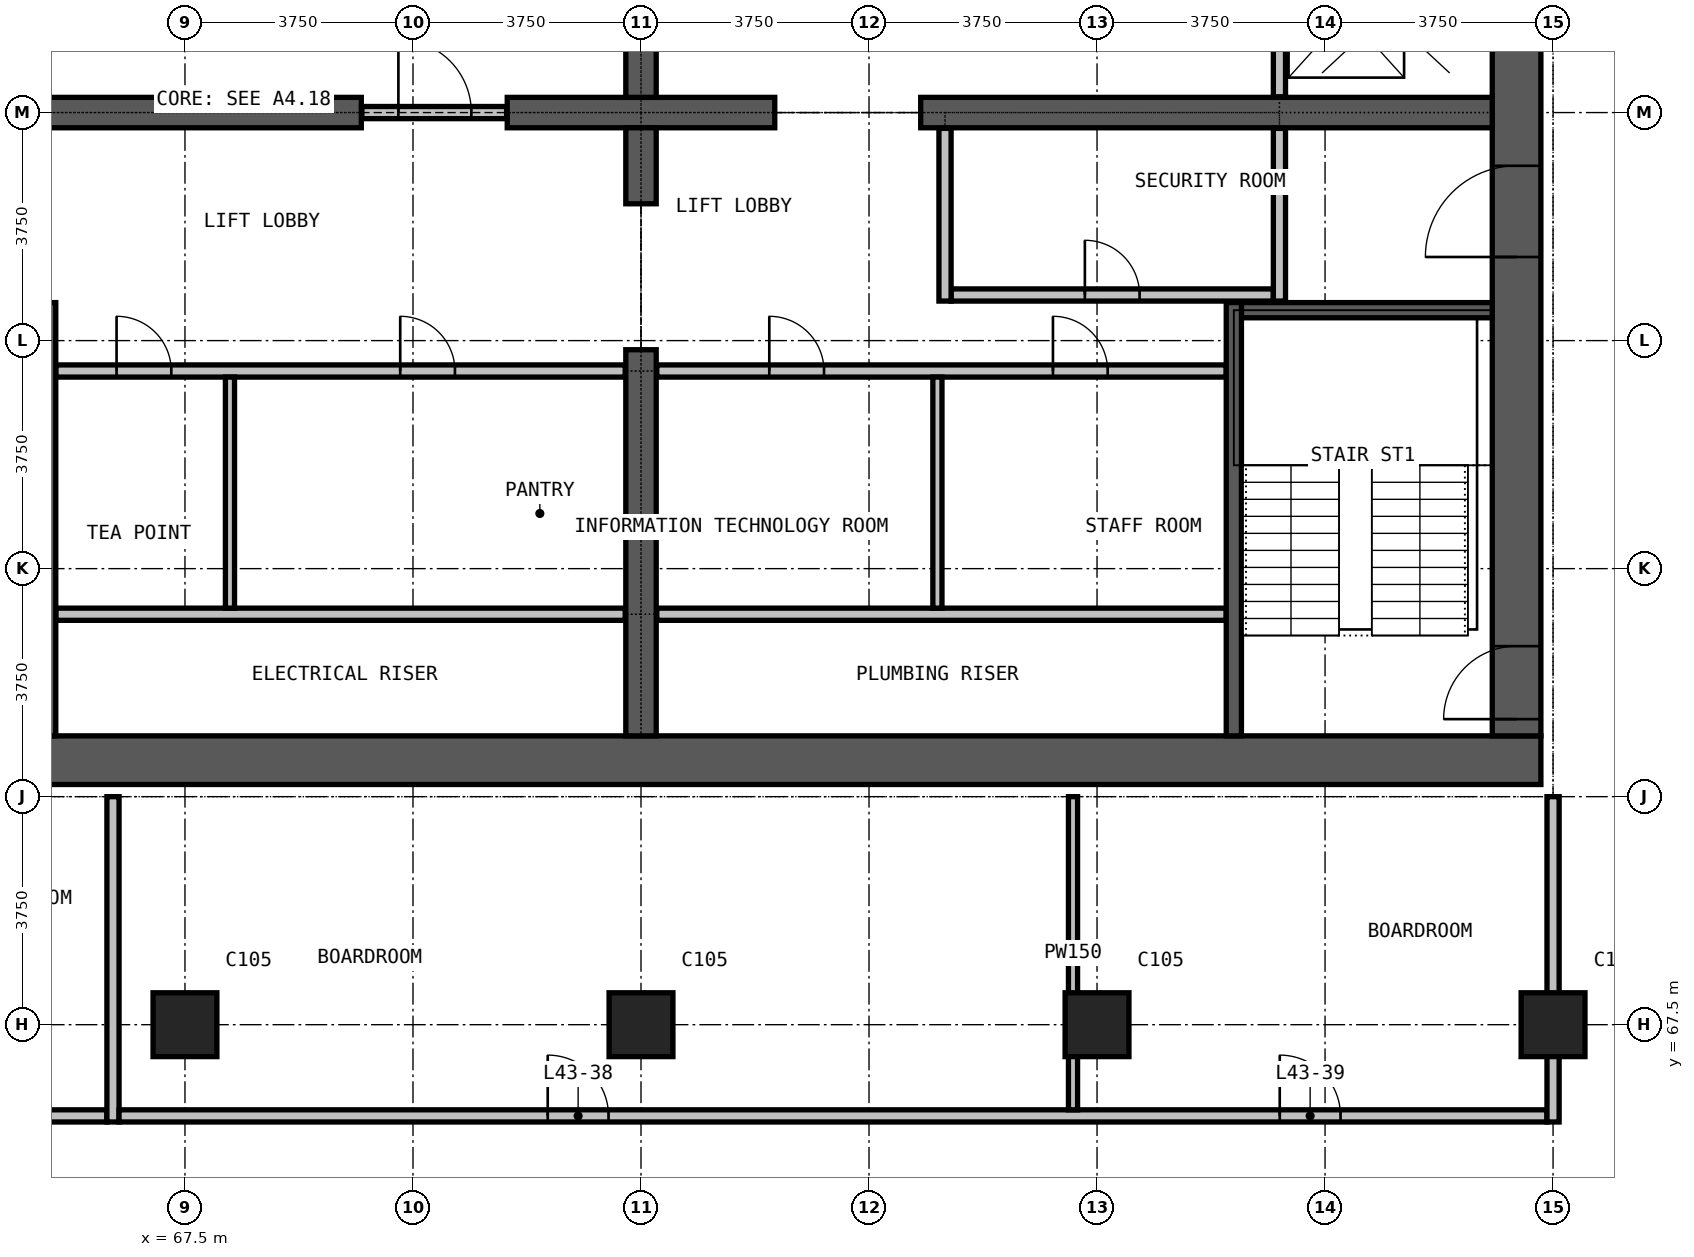
"""IFC4 building model, lengths in metres.
Left out: names, types, materials, properties, quantities, classifications, styles, units other than length and angle.
Written with IfcOpenShell. Run it as: python <this file> out.ifc"""

import sys

from ifc_helpers import new_model, si_unit, direction, frame, frame_2d, origin, origin_2d, place, context, subcontext, project, spatial, rectangle, extrude, element, fill, save


model = new_model("IFC4")
c1 = context("Model", 3, precision=1e-05, world=origin(), true_north=direction((0.0, 1.0)))
c2 = subcontext(c1, "Body", "Model", "MODEL_VIEW")
j1 = project(units=[si_unit("LENGTHUNIT", "METRE"), si_unit("PLANEANGLEUNIT", "RADIAN")], contexts=[c1])
p1 = place(None, origin())
s1 = spatial("IfcSite", under=j1, at=p1, CompositionType="ELEMENT")
p2 = place(p1, origin())
s2 = spatial("IfcBuilding", under=s1, at=p2, CompositionType="ELEMENT")
p3 = place(p2, frame((0.0, 0.0, 169.3)))
s3 = spatial("IfcBuildingStorey", under=s2, at=p3, CompositionType="ELEMENT", Elevation=169.3)
for number, where, z_axis, x_axis in (
    (1, (67.5, 67.5, 0.0), (0.0, 0.0, 1.0), (1.0, 0.0, 0.0)),
    (2, (75.0, 67.5, 0.0), (0.0, 0.0, 1.0), (1.0, 0.0, 0.0)),
    (3, (82.5, 67.5, 0.0), (0.0, 0.0, 1.0), (1.0, 0.0, 0.0)),
    (4, (90.0, 67.5, 0.0), (0.0, 0.0, 1.0), (1.0, 0.0, 0.0)),
):
    element("IfcColumn", number, at=place(p3, frame(where, z_axis=z_axis, x_axis=x_axis)), inside=s3, PredefinedType="COLUMN", context=c2, shape_type="SweptSolid", body=[
        extrude(rectangle(XDim=1.05, YDim=1.05, at=origin_2d()), origin(), (0.0, 0.0, 1.0), 3.6),
    ])
p4 = place(p3, frame((60.2, 71.85, 0.0), z_axis=(0.0, 0.0, 1.0), x_axis=(1.0, 0.0, 0.0)))
e5 = element("IfcWall", 5, at=p4, inside=s3, PredefinedType="SHEAR", context=c2, shape_type="SweptSolid", body=[
    extrude(rectangle(XDim=29.6, YDim=0.8, at=frame_2d((14.8, 0.0))), origin(), (0.0, 0.0, 1.0), 3.6),
])
p5 = place(p3, frame((89.4, 72.25, 0.0), z_axis=(0.0, 0.0, 1.0), x_axis=(0.0, 1.0, 0.0)))
e6 = element("IfcWall", 6, at=p5, inside=s3, PredefinedType="SHEAR", context=c2, shape_type="SweptSolid", body=[
    extrude(rectangle(XDim=20.5, YDim=0.8, at=frame_2d((10.25, 0.0))), origin(), (0.0, 0.0, 1.0), 3.6),
])
p6 = place(p5, frame((0.275, 0.0, 0.0)))
e7 = element("IfcOpeningElement", 7, at=p6, cuts=e6, PredefinedType="OPENING", context=c2, shape_type="SweptSolid", body=[
    extrude(rectangle(XDim=1.2, YDim=2.2, at=frame_2d((0.6, 1.1))), frame((0.0, 0.41, 0.0), z_axis=(0.0, -1.0, 0.0), x_axis=(1.0, 0.0, 0.0)), (0.0, 0.0, 1.0), 0.82),
])
p7 = place(p5, frame((13.775, 0.0, 0.0)))
e8 = element("IfcOpeningElement", 8, at=p7, cuts=e6, PredefinedType="OPENING", context=c2, shape_type="SweptSolid", body=[
    extrude(rectangle(XDim=1.2, YDim=2.2, at=frame_2d((0.6, 1.1))), frame((0.0, 0.41, 0.0), z_axis=(0.0, -1.0, 0.0), x_axis=(1.0, 0.0, 0.0)), (0.0, 0.0, 1.0), 0.82),
])
p8 = place(p5, frame((7.875, 0.0, 0.0)))
e9 = element("IfcOpeningElement", 9, at=p8, cuts=e6, PredefinedType="OPENING", context=c2, shape_type="SweptSolid", body=[
    extrude(rectangle(XDim=1.5, YDim=2.2, at=frame_2d((0.75, 1.1))), frame((0.0, 0.41, 0.0), z_axis=(0.0, -1.0, 0.0), x_axis=(1.0, 0.0, 0.0)), (0.0, 0.0, 1.0), 0.82),
])
p9 = place(p3, frame((61.0, 82.5, 0.0), z_axis=(0.0, 0.0, 1.0), x_axis=(1.0, 0.0, 0.0)))
e10 = element("IfcWall", 10, at=p9, inside=s3, PredefinedType="SHEAR", context=c2, shape_type="SweptSolid", body=[
    extrude(rectangle(XDim=9.4, YDim=0.5, at=frame_2d((4.7, 0.0))), origin(), (0.0, 0.0, 1.0), 3.6),
])
p10 = place(p3, frame((72.8, 82.5, 0.0), z_axis=(0.0, 0.0, 1.0), x_axis=(1.0, 0.0, 0.0)))
e11 = element("IfcWall", 11, at=p10, inside=s3, PredefinedType="SHEAR", context=c2, shape_type="SweptSolid", body=[
    extrude(rectangle(XDim=4.4, YDim=0.5, at=frame_2d((2.2, 0.0))), origin(), (0.0, 0.0, 1.0), 3.6),
])
p11 = place(p3, frame((79.6, 82.5, 0.0), z_axis=(0.0, 0.0, 1.0), x_axis=(1.0, 0.0, 0.0)))
e12 = element("IfcWall", 12, at=p11, inside=s3, PredefinedType="SHEAR", context=c2, shape_type="SweptSolid", body=[
    extrude(rectangle(XDim=9.4, YDim=0.5, at=frame_2d((4.7, 0.0))), origin(), (0.0, 0.0, 1.0), 3.6),
])
p12 = place(p3, frame((75.0, 72.25, 0.0), z_axis=(0.0, 0.0, 1.0), x_axis=(0.0, 1.0, 0.0)))
e13 = element("IfcWall", 13, at=p12, inside=s3, PredefinedType="SHEAR", context=c2, shape_type="SweptSolid", body=[
    extrude(rectangle(XDim=6.35, YDim=0.5, at=frame_2d((3.175, 0.0))), origin(), (0.0, 0.0, 1.0), 3.6),
])
for number, where, z_axis, x_axis in (
    (14, (75.0, 81.0, 0.0), (0.0, 0.0, 1.0), (0.0, 1.0, 0.0)),
    (15, (75.0, 82.75, 0.0), (0.0, 0.0, 1.0), (0.0, 1.0, 0.0)),
):
    element("IfcWall", number, at=place(p3, frame(where, z_axis=z_axis, x_axis=x_axis)), inside=s3, PredefinedType="SHEAR", context=c2, shape_type="SweptSolid", body=[
        extrude(rectangle(XDim=1.25, YDim=0.5, at=frame_2d((0.625, 0.0))), origin(), (0.0, 0.0, 1.0), 3.6),
    ])
p13 = place(p3, frame((60.1, 66.0, 0.0), z_axis=(0.0, 0.0, 1.0), x_axis=(1.0, 0.0, 0.0)))
e16 = element("IfcWall", 16, at=p13, inside=s3, PredefinedType="PARTITIONING", context=c2, shape_type="SweptSolid", body=[
    extrude(rectangle(XDim=6.116, YDim=0.2, at=frame_2d((3.058, 0.0))), origin(), (0.0, 0.0, 1.0), 3.3),
])
p14 = place(p13, frame((2.15, 0.0, 0.0)))
e17 = element("IfcOpeningElement", 17, at=p14, cuts=e16, PredefinedType="OPENING", context=c2, shape_type="SweptSolid", body=[
    extrude(rectangle(XDim=1.8, YDim=2.4, at=frame_2d((0.9, 1.2))), frame((0.0, 0.11, 0.0), z_axis=(0.0, -1.0, 0.0), x_axis=(1.0, 0.0, 0.0)), (0.0, 0.0, 1.0), 0.22),
])
for number, where, z_axis, x_axis in (
    (18, (65.375, 74.25, 0.0), (0.0, 0.0, 1.0), (1.0, 0.0, 0.0)),
    (19, (75.26, 74.25, 0.0), (0.0, 0.0, 1.0), (1.0, 0.0, 0.0)),
):
    element("IfcWall", number, at=place(p3, frame(where, z_axis=z_axis, x_axis=x_axis)), inside=s3, PredefinedType="PARTITIONING", context=c2, shape_type="SweptSolid", body=[
        extrude(rectangle(XDim=9.365, YDim=0.2, at=frame_2d((4.683, 0.0))), origin(), (0.0, 0.0, 1.0), 3.3),
    ])
p15 = place(p3, frame((65.375, 78.25, 0.0), z_axis=(0.0, 0.0, 1.0), x_axis=(1.0, 0.0, 0.0)))
e20 = element("IfcWall", 20, at=p15, inside=s3, PredefinedType="PARTITIONING", context=c2, shape_type="SweptSolid", body=[
    extrude(rectangle(XDim=9.365, YDim=0.2, at=frame_2d((4.683, 0.0))), origin(), (0.0, 0.0, 1.0), 3.3),
])
p16 = place(p15, frame((1.0, 0.0, 0.0)))
e21 = element("IfcOpeningElement", 21, at=p16, cuts=e20, PredefinedType="OPENING", context=c2, shape_type="SweptSolid", body=[
    extrude(rectangle(XDim=0.9, YDim=2.2, at=frame_2d((0.45, 1.1))), frame((0.0, 0.11, 0.0), z_axis=(0.0, -1.0, 0.0), x_axis=(1.0, 0.0, 0.0)), (0.0, 0.0, 1.0), 0.22),
])
p17 = place(p15, frame((5.665, 0.0, 0.0)))
e22 = element("IfcOpeningElement", 22, at=p17, cuts=e20, PredefinedType="OPENING", context=c2, shape_type="SweptSolid", body=[
    extrude(rectangle(XDim=0.9, YDim=2.2, at=frame_2d((0.45, 1.1))), frame((0.0, 0.11, 0.0), z_axis=(0.0, -1.0, 0.0), x_axis=(1.0, 0.0, 0.0)), (0.0, 0.0, 1.0), 0.22),
])
p18 = place(p3, frame((75.26, 78.25, 0.0), z_axis=(0.0, 0.0, 1.0), x_axis=(1.0, 0.0, 0.0)))
e23 = element("IfcWall", 23, at=p18, inside=s3, PredefinedType="PARTITIONING", context=c2, shape_type="SweptSolid", body=[
    extrude(rectangle(XDim=9.365, YDim=0.2, at=frame_2d((4.683, 0.0))), origin(), (0.0, 0.0, 1.0), 3.3),
])
p19 = place(p18, frame((1.85, 0.0, 0.0)))
e24 = element("IfcOpeningElement", 24, at=p19, cuts=e23, PredefinedType="OPENING", context=c2, shape_type="SweptSolid", body=[
    extrude(rectangle(XDim=0.9, YDim=2.2, at=frame_2d((0.45, 1.1))), frame((0.0, 0.11, 0.0), z_axis=(0.0, -1.0, 0.0), x_axis=(1.0, 0.0, 0.0)), (0.0, 0.0, 1.0), 0.22),
])
p20 = place(p18, frame((6.515, 0.0, 0.0)))
e25 = element("IfcOpeningElement", 25, at=p20, cuts=e23, PredefinedType="OPENING", context=c2, shape_type="SweptSolid", body=[
    extrude(rectangle(XDim=0.9, YDim=2.2, at=frame_2d((0.45, 1.1))), frame((0.0, 0.11, 0.0), z_axis=(0.0, -1.0, 0.0), x_axis=(1.0, 0.0, 0.0)), (0.0, 0.0, 1.0), 0.22),
])
p21 = place(p3, frame((80.1, 79.5, 0.0), z_axis=(0.0, 0.0, 1.0), x_axis=(1.0, 0.0, 0.0)))
e26 = element("IfcWall", 26, at=p21, inside=s3, PredefinedType="PARTITIONING", context=c2, shape_type="SweptSolid", body=[
    extrude(rectangle(XDim=5.3, YDim=0.2, at=frame_2d((2.65, 0.0))), origin(), (0.0, 0.0, 1.0), 3.3),
])
p22 = place(p21, frame((2.2, 0.0, 0.0)))
e27 = element("IfcOpeningElement", 27, at=p22, cuts=e26, PredefinedType="OPENING", context=c2, shape_type="SweptSolid", body=[
    extrude(rectangle(XDim=0.9, YDim=2.2, at=frame_2d((0.45, 1.1))), frame((0.0, 0.11, 0.0), z_axis=(0.0, -1.0, 0.0), x_axis=(1.0, 0.0, 0.0)), (0.0, 0.0, 1.0), 0.22),
])
p23 = place(p3, frame((70.41, 82.5, 0.0), z_axis=(0.0, 0.0, 1.0), x_axis=(1.0, 0.0, 0.0)))
e28 = element("IfcWall", 28, at=p23, inside=s3, PredefinedType="PARTITIONING", context=c2, shape_type="SweptSolid", body=[
    extrude(rectangle(XDim=2.38, YDim=0.2, at=frame_2d((1.19, 0.0))), origin(), (0.0, 0.0, 1.0), 2.4),
])
p24 = place(p23, frame((0.6, 0.0, 0.0)))
e29 = element("IfcOpeningElement", 29, at=p24, cuts=e28, PredefinedType="OPENING", context=c2, shape_type="SweptSolid", body=[
    extrude(rectangle(XDim=1.2, YDim=2.2, at=frame_2d((0.6, 1.1))), frame((0.0, 0.11, 0.0), z_axis=(0.0, -1.0, 0.0), x_axis=(1.0, 0.0, 0.0)), (0.0, 0.0, 1.0), 0.22),
])
p25 = place(p3, frame((66.316, 65.9, 0.0), z_axis=(0.0, 0.0, 1.0), x_axis=(0.0, 1.0, 0.0)))
e30 = element("IfcWall", 30, at=p25, inside=s3, PredefinedType="PARTITIONING", context=c2, shape_type="SweptSolid", body=[
    extrude(rectangle(XDim=5.35, YDim=0.2, at=frame_2d((2.675, 0.0))), origin(), (0.0, 0.0, 1.0), 3.3),
])
for number, where, z_axis, x_axis in (
    (31, (80.0, 79.4, 0.0), (0.0, 0.0, 1.0), (0.0, 1.0, 0.0)),
    (32, (85.5, 79.4, 0.0), (0.0, 0.0, 1.0), (0.0, 1.0, 0.0)),
):
    element("IfcWall", number, at=place(p3, frame(where, z_axis=z_axis, x_axis=x_axis)), inside=s3, PredefinedType="PARTITIONING", context=c2, shape_type="SweptSolid", body=[
        extrude(rectangle(XDim=2.84, YDim=0.2, at=frame_2d((1.42, 0.0))), origin(), (0.0, 0.0, 1.0), 3.3),
    ])
p26 = place(p3, frame((66.416, 66.0, 0.0), z_axis=(0.0, 0.0, 1.0), x_axis=(1.0, 0.0, 0.0)))
e33 = element("IfcWall", 33, at=p26, inside=s3, PredefinedType="PARTITIONING", context=c2, shape_type="SweptSolid", body=[
    extrude(rectangle(XDim=23.484, YDim=0.2, at=frame_2d((11.742, 0.0))), origin(), (0.0, 0.0, 1.0), 3.3),
])
p27 = place(p26, frame((7.05, 0.0, 0.0)))
e34 = element("IfcOpeningElement", 34, at=p27, cuts=e33, PredefinedType="OPENING", context=c2, shape_type="SweptSolid", body=[
    extrude(rectangle(XDim=1.0, YDim=2.2, at=frame_2d((0.5, 1.1))), frame((0.0, 0.11, 0.0), z_axis=(0.0, -1.0, 0.0), x_axis=(1.0, 0.0, 0.0)), (0.0, 0.0, 1.0), 0.22),
])
p28 = place(p26, frame((19.089, 0.0, 0.0)))
e35 = element("IfcOpeningElement", 35, at=p28, cuts=e33, PredefinedType="OPENING", context=c2, shape_type="SweptSolid", body=[
    extrude(rectangle(XDim=1.0, YDim=2.2, at=frame_2d((0.5, 1.1))), frame((0.0, 0.11, 0.0), z_axis=(0.0, -1.0, 0.0), x_axis=(1.0, 0.0, 0.0)), (0.0, 0.0, 1.0), 0.22),
])
p29 = place(p3, frame((90.0, 65.9, 0.0), z_axis=(0.0, 0.0, 1.0), x_axis=(0.0, 1.0, 0.0)))
e36 = element("IfcWall", 36, at=p29, inside=s3, PredefinedType="PARTITIONING", context=c2, shape_type="SweptSolid", body=[
    extrude(rectangle(XDim=5.35, YDim=0.2, at=frame_2d((2.675, 0.0))), origin(), (0.0, 0.0, 1.0), 3.3),
])
for number, where, z_axis, x_axis in (
    (37, (68.24, 74.35, 0.0), (0.0, 0.0, 1.0), (0.0, 1.0, 0.0)),
    (38, (79.875, 74.35, 0.0), (0.0, 0.0, 1.0), (0.0, 1.0, 0.0)),
):
    element("IfcWall", number, at=place(p3, frame(where, z_axis=z_axis, x_axis=x_axis)), inside=s3, PredefinedType="PARTITIONING", context=c2, shape_type="SweptSolid", body=[
        extrude(rectangle(XDim=3.8, YDim=0.15, at=frame_2d((1.9, 0.0))), origin(), (0.0, 0.0, 1.0), 3.3),
    ])
p30 = place(p3, frame((82.105, 66.1, 0.0), z_axis=(0.0, 0.0, 1.0), x_axis=(0.0, 1.0, 0.0)))
e39 = element("IfcWall", 39, at=p30, inside=s3, PredefinedType="PARTITIONING", context=c2, shape_type="SweptSolid", body=[
    extrude(rectangle(XDim=5.15, YDim=0.15, at=frame_2d((2.575, 0.0))), origin(), (0.0, 0.0, 1.0), 3.3),
])
p31 = place(p3, frame((85.5, 82.76, 0.0), z_axis=(0.0, 0.0, 1.0), x_axis=(0.0, 1.0, 0.0)))
e40 = element("IfcWall", 40, at=p31, inside=s3, PredefinedType="PARTITIONING", context=c2, shape_type="SweptSolid", body=[
    extrude(rectangle(XDim=2.865, YDim=0.2, at=frame_2d((1.433, 0.0))), origin(), (0.0, 0.0, 1.0), 3.3),
])
p32 = place(p31, frame((0.9, 0.0, 0.0)))
e41 = element("IfcOpeningElement", 41, at=p32, cuts=e40, PredefinedType="OPENING", context=c2, shape_type="SweptSolid", body=[
    extrude(rectangle(XDim=1.1, YDim=2.2, at=frame_2d((0.55, 1.1))), frame((0.0, 0.11, 0.0), z_axis=(0.0, -1.0, 0.0), x_axis=(1.0, 0.0, 0.0)), (0.0, 0.0, 1.0), 0.22),
])
p33 = place(p3, frame((84.875, 79.25, 0.0), z_axis=(0.0, 0.0, 1.0), x_axis=(1.0, 0.0, 0.0)))
e42 = element("IfcWall", 42, at=p33, inside=s3, PredefinedType="PARTITIONING", context=c2, shape_type="SweptSolid", body=[
    extrude(rectangle(XDim=4.125, YDim=0.25, at=frame_2d((2.062, 0.0))), origin(), (0.0, 0.0, 1.0), 3.3),
])
for number, where, z_axis, x_axis in (
    (43, (65.25, 72.25, 0.0), (0.0, 0.0, 1.0), (0.0, 1.0, 0.0)),
    (44, (84.75, 72.25, 0.0), (0.0, 0.0, 1.0), (0.0, 1.0, 0.0)),
):
    element("IfcWall", number, at=place(p3, frame(where, z_axis=z_axis, x_axis=x_axis)), inside=s3, PredefinedType="PARTITIONING", context=c2, shape_type="SweptSolid", body=[
        extrude(rectangle(XDim=7.125, YDim=0.25, at=frame_2d((3.562, 0.0))), origin(), (0.0, 0.0, 1.0), 3.3),
    ])
p34 = place(p24, origin())
e45 = element("IfcDoor", 45, at=p34, inside=s3, OperationType="SINGLE_SWING_LEFT", PredefinedType="DOOR", context=c2, shape_type="SweptSolid", body=[
    extrude(rectangle(XDim=1.2, YDim=2.2, at=frame_2d((0.6, 1.1))), frame((0.0, 0.025, 0.0), z_axis=(0.0, -1.0, 0.0), x_axis=(1.0, 0.0, 0.0)), (0.0, 0.0, 1.0), 0.05),
])
fill(e29, e45)
p35 = place(p6, origin())
e46 = element("IfcDoor", 46, at=p35, inside=s3, OperationType="SINGLE_SWING_LEFT", PredefinedType="DOOR", context=c2, shape_type="SweptSolid", body=[
    extrude(rectangle(XDim=1.2, YDim=2.2, at=frame_2d((0.6, 1.1))), frame((0.0, 0.025, 0.0), z_axis=(0.0, -1.0, 0.0), x_axis=(1.0, 0.0, 0.0)), (0.0, 0.0, 1.0), 0.05),
])
fill(e7, e46)
p36 = place(p8, origin())
e47 = element("IfcDoor", 47, at=p36, inside=s3, OperationType="DOUBLE_DOOR_SINGLE_SWING", PredefinedType="DOOR", context=c2, shape_type="SweptSolid", body=[
    extrude(rectangle(XDim=1.5, YDim=2.2, at=frame_2d((0.75, 1.1))), frame((0.0, 0.025, 0.0), z_axis=(0.0, -1.0, 0.0), x_axis=(1.0, 0.0, 0.0)), (0.0, 0.0, 1.0), 0.05),
])
fill(e9, e47)
p37 = place(p22, origin())
e48 = element("IfcDoor", 48, at=p37, inside=s3, OperationType="SINGLE_SWING_RIGHT", PredefinedType="DOOR", context=c2, shape_type="SweptSolid", body=[
    extrude(rectangle(XDim=0.9, YDim=2.2, at=frame_2d((0.45, 1.1))), frame((0.0, 0.025, 0.0), z_axis=(0.0, -1.0, 0.0), x_axis=(1.0, 0.0, 0.0)), (0.0, 0.0, 1.0), 0.05),
])
fill(e27, e48)
p38 = place(p16, origin())
e49 = element("IfcDoor", 49, at=p38, inside=s3, OperationType="SINGLE_SWING_RIGHT", PredefinedType="DOOR", context=c2, shape_type="SweptSolid", body=[
    extrude(rectangle(XDim=0.9, YDim=2.2, at=frame_2d((0.45, 1.1))), frame((0.0, 0.025, 0.0), z_axis=(0.0, -1.0, 0.0), x_axis=(1.0, 0.0, 0.0)), (0.0, 0.0, 1.0), 0.05),
])
fill(e21, e49)
p39 = place(p17, origin())
e50 = element("IfcDoor", 50, at=p39, inside=s3, OperationType="SINGLE_SWING_LEFT", PredefinedType="DOOR", context=c2, shape_type="SweptSolid", body=[
    extrude(rectangle(XDim=0.9, YDim=2.2, at=frame_2d((0.45, 1.1))), frame((0.0, 0.025, 0.0), z_axis=(0.0, -1.0, 0.0), x_axis=(1.0, 0.0, 0.0)), (0.0, 0.0, 1.0), 0.05),
])
fill(e22, e50)
p40 = place(p19, origin())
e51 = element("IfcDoor", 51, at=p40, inside=s3, OperationType="SINGLE_SWING_RIGHT", PredefinedType="DOOR", context=c2, shape_type="SweptSolid", body=[
    extrude(rectangle(XDim=0.9, YDim=2.2, at=frame_2d((0.45, 1.1))), frame((0.0, 0.025, 0.0), z_axis=(0.0, -1.0, 0.0), x_axis=(1.0, 0.0, 0.0)), (0.0, 0.0, 1.0), 0.05),
])
fill(e24, e51)
p41 = place(p20, origin())
e52 = element("IfcDoor", 52, at=p41, inside=s3, OperationType="SINGLE_SWING_LEFT", PredefinedType="DOOR", context=c2, shape_type="SweptSolid", body=[
    extrude(rectangle(XDim=0.9, YDim=2.2, at=frame_2d((0.45, 1.1))), frame((0.0, 0.025, 0.0), z_axis=(0.0, -1.0, 0.0), x_axis=(1.0, 0.0, 0.0)), (0.0, 0.0, 1.0), 0.05),
])
fill(e25, e52)
p42 = place(p27, origin())
e53 = element("IfcDoor", 53, at=p42, inside=s3, OperationType="SINGLE_SWING_LEFT", PredefinedType="DOOR", context=c2, shape_type="SweptSolid", body=[
    extrude(rectangle(XDim=1.0, YDim=2.2, at=frame_2d((0.5, 1.1))), frame((0.0, 0.025, 0.0), z_axis=(0.0, -1.0, 0.0), x_axis=(1.0, 0.0, 0.0)), (0.0, 0.0, 1.0), 0.05),
])
fill(e34, e53)
p43 = place(p28, origin())
e54 = element("IfcDoor", 54, at=p43, inside=s3, OperationType="SINGLE_SWING_LEFT", PredefinedType="DOOR", context=c2, shape_type="SweptSolid", body=[
    extrude(rectangle(XDim=1.0, YDim=2.2, at=frame_2d((0.5, 1.1))), frame((0.0, 0.025, 0.0), z_axis=(0.0, -1.0, 0.0), x_axis=(1.0, 0.0, 0.0)), (0.0, 0.0, 1.0), 0.05),
])
fill(e35, e54)
save(model, sys.argv[1])
